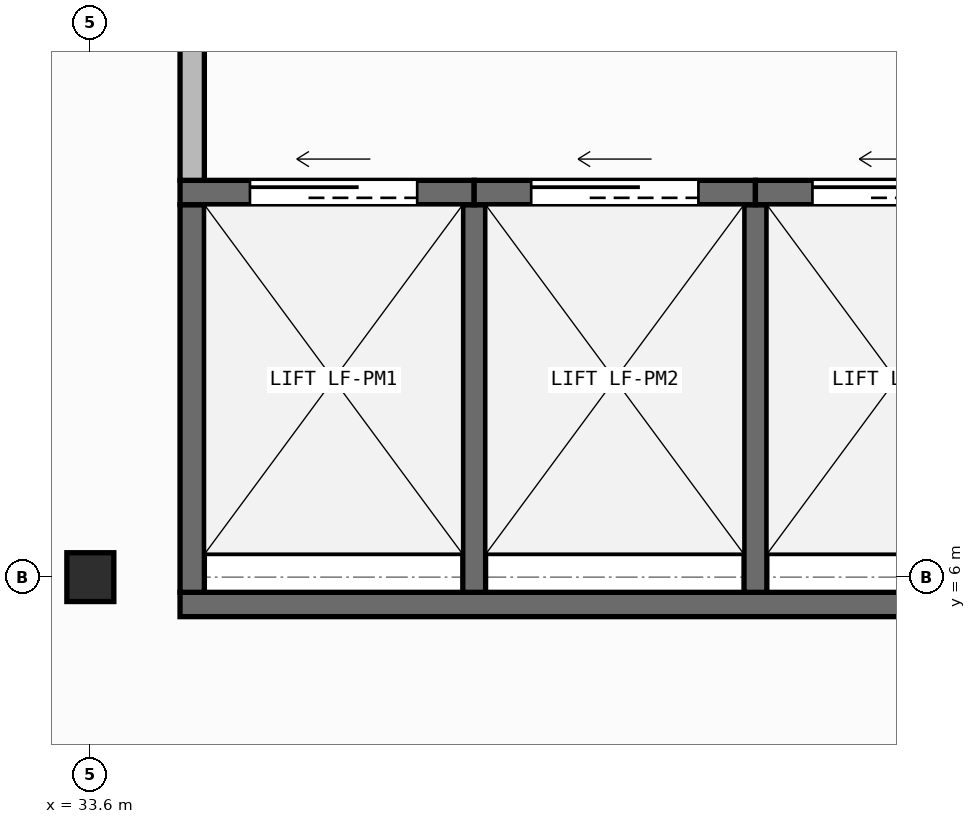
"""IFC4 building model, lengths in metres.
Left out: names, types, materials, properties, quantities, classifications, styles, units other than length and angle.
Written with IfcOpenShell. Run it as: python <this file> out.ifc"""

import sys

from ifc_helpers import new_model, si_unit, direction, frame, frame_2d, origin, origin_2d, place, context, subcontext, project, spatial, rectangle, i_section, extrude, element, save


model = new_model("IFC4")
c1 = context("Model", 3, precision=1e-05, world=origin(), true_north=direction((0.0, 1.0)))
c2 = subcontext(c1, "Body", "Model", "MODEL_VIEW")
j1 = project(units=[si_unit("LENGTHUNIT", "METRE"), si_unit("PLANEANGLEUNIT", "RADIAN")], contexts=[c1])
p1 = place(None, origin())
s1 = spatial("IfcSite", under=j1, at=p1, CompositionType="ELEMENT")
p2 = place(p1, origin())
s2 = spatial("IfcBuilding", under=s1, at=p2, CompositionType="ELEMENT")
p3 = place(p2, frame((0.0, 0.0, 97.55)))
s3 = spatial("IfcBuildingStorey", under=s2, at=p3, CompositionType="ELEMENT", Elevation=97.55)
p4 = place(p3, frame((33.6, 6.0, 0.0), z_axis=(0.0, 0.0, 1.0), x_axis=(1.0, 0.0, 0.0)))
e1 = element("IfcColumn", 1, at=p4, inside=s3, PredefinedType="COLUMN", context=c2, shape_type="SweptSolid", body=[
    extrude(i_section(OverallWidth=0.311, OverallDepth=0.327, WebThickness=0.016, FlangeThickness=0.025, FilletRadius=0.017, at=origin_2d()), origin(), (0.0, 0.0, 1.0), 5.8),
])
p5 = place(p3, frame((34.19, 5.82, 0.0), z_axis=(0.0, 0.0, 1.0), x_axis=(1.0, 0.0, 0.0)))
e2 = element("IfcWall", 2, at=p5, inside=s3, PredefinedType="SHEAR", context=c2, shape_type="SweptSolid", body=[
    extrude(rectangle(XDim=5.72, YDim=0.16, at=frame_2d((2.86, 0.0))), origin(), (0.0, 0.0, 1.0), 5.56),
])
p6 = place(p3, frame((34.27, 5.9, 0.0), z_axis=(0.0, 0.0, 1.0), x_axis=(0.0, 1.0, 0.0)))
e3 = element("IfcWall", 3, at=p6, inside=s3, PredefinedType="SHEAR", context=c2, shape_type="SweptSolid", body=[
    extrude(rectangle(XDim=2.55, YDim=0.16, at=frame_2d((1.275, 0.0))), origin(), (0.0, 0.0, 1.0), 5.56),
])
for number, where, z_axis, x_axis in (
    (4, (36.125, 5.9, 0.0), (0.0, 0.0, 1.0), (0.0, 1.0, 0.0)),
    (5, (37.975, 5.9, 0.0), (0.0, 0.0, 1.0), (0.0, 1.0, 0.0)),
):
    element("IfcWall", number, at=place(p3, frame(where, z_axis=z_axis, x_axis=x_axis)), inside=s3, PredefinedType="SHEAR", context=c2, shape_type="SweptSolid", body=[
        extrude(rectangle(XDim=2.55, YDim=0.15, at=frame_2d((1.275, 0.0))), origin(), (0.0, 0.0, 1.0), 5.56),
    ])
p7 = place(p3, frame((34.19, 8.53, 0.0), z_axis=(0.0, 0.0, 1.0), x_axis=(1.0, 0.0, 0.0)))
e6 = element("IfcWall", 6, at=p7, inside=s3, PredefinedType="SHEAR", context=c2, shape_type="SweptSolid", body=[
    extrude(rectangle(XDim=1.935, YDim=0.16, at=frame_2d((0.968, 0.0))), origin(), (0.0, 0.0, 1.0), 5.56),
])
p8 = place(p3, frame((36.125, 8.53, 0.0), z_axis=(0.0, 0.0, 1.0), x_axis=(1.0, 0.0, 0.0)))
e7 = element("IfcWall", 7, at=p8, inside=s3, PredefinedType="SHEAR", context=c2, shape_type="SweptSolid", body=[
    extrude(rectangle(XDim=1.85, YDim=0.16, at=frame_2d((0.925, 0.0))), origin(), (0.0, 0.0, 1.0), 5.56),
])
p9 = place(p3, frame((37.975, 8.53, 0.0), z_axis=(0.0, 0.0, 1.0), x_axis=(1.0, 0.0, 0.0)))
e8 = element("IfcWall", 8, at=p9, inside=s3, PredefinedType="SHEAR", context=c2, shape_type="SweptSolid", body=[
    extrude(rectangle(XDim=1.935, YDim=0.16, at=frame_2d((0.967, 0.0))), origin(), (0.0, 0.0, 1.0), 5.56),
])
save(model, sys.argv[1])
